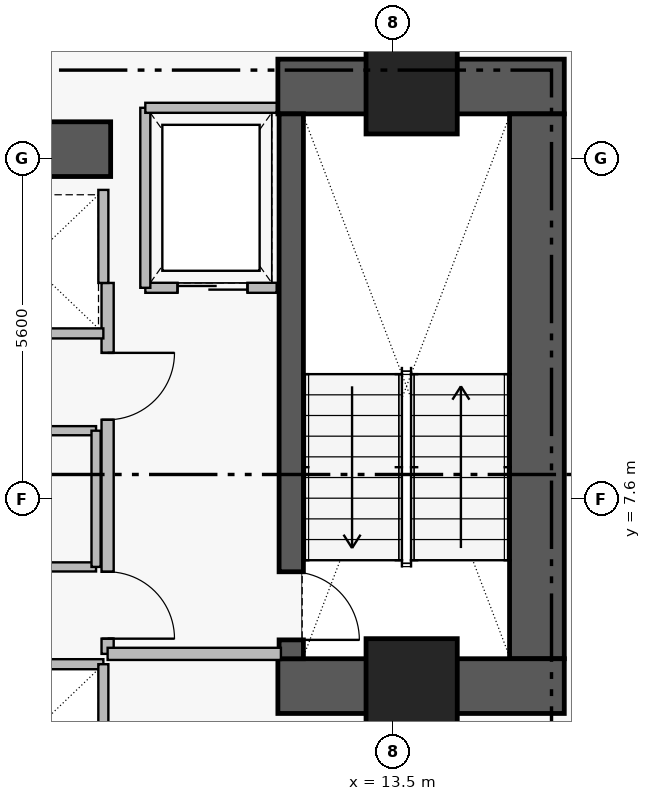
"""IFC4 building model, lengths in metres.
Left out: names, types, materials, properties, quantities, classifications, styles, units other than length and angle.
Written with IfcOpenShell. Run it as: python <this file> out.ifc"""

import sys

from ifc_helpers import new_model, si_unit, direction, frame, frame_2d, origin, origin_2d, place, context, subcontext, project, spatial, rectangle, extrude, element, fill, save


model = new_model("IFC4")
c1 = context("Model", 3, precision=1e-05, world=origin(), true_north=direction((0.0, 1.0)))
c2 = subcontext(c1, "Body", "Model", "MODEL_VIEW")
j1 = project(units=[si_unit("LENGTHUNIT", "METRE"), si_unit("PLANEANGLEUNIT", "RADIAN")], contexts=[c1])
p1 = place(None, origin())
s1 = spatial("IfcSite", under=j1, at=p1, CompositionType="ELEMENT")
p2 = place(p1, origin())
s2 = spatial("IfcBuilding", under=s1, at=p2, CompositionType="ELEMENT")
p3 = place(p2, frame((0.0, 0.0, 27.6)))
s3 = spatial("IfcBuildingStorey", under=s2, at=p3, CompositionType="ELEMENT", Elevation=27.6)
p4 = place(p3, frame((11.6, 14.38, 0.0), z_axis=(0.0, 0.0, 1.0), x_axis=(1.0, 0.0, 0.0)))
e1 = element("IfcWall", 1, at=p4, inside=s3, PredefinedType="SHEAR", context=c2, shape_type="SweptSolid", body=[
    extrude(rectangle(XDim=4.71, YDim=0.9, at=frame_2d((2.355, 0.0))), origin(), (0.0, 0.0, 1.0), 3.46),
])
p5 = place(p3, frame((15.86, 4.97, 0.0), z_axis=(0.0, 0.0, 1.0), x_axis=(0.0, 1.0, 0.0)))
e2 = element("IfcWall", 2, at=p5, inside=s3, PredefinedType="SHEAR", context=c2, shape_type="SweptSolid", body=[
    extrude(rectangle(XDim=8.96, YDim=0.9, at=frame_2d((4.48, 0.0))), origin(), (0.0, 0.0, 1.0), 3.46),
])
p6 = place(p3, frame((11.6, 4.52, 0.0), z_axis=(0.0, 0.0, 1.0), x_axis=(1.0, 0.0, 0.0)))
e3 = element("IfcWall", 3, at=p6, inside=s3, PredefinedType="SHEAR", context=c2, shape_type="SweptSolid", body=[
    extrude(rectangle(XDim=4.71, YDim=0.9, at=frame_2d((2.355, 0.0))), origin(), (0.0, 0.0, 1.0), 3.46),
])
p7 = place(p3, frame((1.25, 13.35, 0.0), z_axis=(0.0, 0.0, 1.0), x_axis=(1.0, 0.0, 0.0)))
e4 = element("IfcWall", 4, at=p7, inside=s3, PredefinedType="SHEAR", context=c2, shape_type="SweptSolid", body=[
    extrude(rectangle(XDim=7.6, YDim=0.9, at=frame_2d((3.8, 0.0))), origin(), (0.0, 0.0, 1.0), 3.43),
])
p8 = place(p3, frame((11.82, 13.93, 0.0), z_axis=(0.0, 0.0, 1.0), x_axis=(0.0, -1.0, 0.0)))
e5 = element("IfcWall", 5, at=p8, inside=s3, PredefinedType="SHEAR", context=c2, shape_type="SweptSolid", body=[
    extrude(rectangle(XDim=8.96, YDim=0.4, at=frame_2d((4.48, 0.0))), origin(), (0.0, 0.0, 1.0), 3.46),
])
p9 = place(p8, frame((7.53, 0.0, 0.0)))
e6 = element("IfcOpeningElement", 6, at=p9, cuts=e5, PredefinedType="OPENING", context=c2, shape_type="SweptSolid", body=[
    extrude(rectangle(XDim=1.12, YDim=2.22, at=frame_2d((0.56, 1.11))), frame((0.0, 0.21, 0.0), z_axis=(0.0, -1.0, 0.0), x_axis=(1.0, 0.0, 0.0)), (0.0, 0.0, 1.0), 0.42),
])
for number, where, z_axis, x_axis in (
    (7, (13.8, 14.35, 0.0), (0.0, 0.0, 1.0), (1.0, 0.0, 0.0)),
    (8, (13.8, 4.55, 0.0), (0.0, 0.0, 1.0), (1.0, 0.0, 0.0)),
):
    element("IfcColumn", number, at=place(p3, frame(where, z_axis=z_axis, x_axis=x_axis)), inside=s3, PredefinedType="COLUMN", context=c2, shape_type="SweptSolid", body=[
        extrude(rectangle(XDim=1.5, YDim=1.5, at=origin_2d()), origin(), (0.0, 0.0, 1.0), 3.65),
    ])
p10 = place(p3, frame((8.8, 11.15, 0.0), z_axis=(0.0, 0.0, 1.0), x_axis=(0.0, -1.0, 0.0)))
e9 = element("IfcWall", 9, at=p10, inside=s3, PredefinedType="PARTITIONING", context=c2, shape_type="SweptSolid", body=[
    extrude(rectangle(XDim=6.1, YDim=0.2, at=frame_2d((3.05, 0.0))), origin(), (0.0, 0.0, 1.0), 3.43),
])
p11 = place(p10, frame((1.15, 0.0, 0.0)))
e10 = element("IfcOpeningElement", 10, at=p11, cuts=e9, PredefinedType="OPENING", context=c2, shape_type="SweptSolid", body=[
    extrude(rectangle(XDim=1.1, YDim=2.2, at=frame_2d((0.55, 1.1))), frame((0.0, 0.11, 0.0), z_axis=(0.0, -1.0, 0.0), x_axis=(1.0, 0.0, 0.0)), (0.0, 0.0, 1.0), 0.22),
])
p12 = place(p10, frame((4.75, 0.0, 0.0)))
e11 = element("IfcOpeningElement", 11, at=p12, cuts=e9, PredefinedType="OPENING", context=c2, shape_type="SweptSolid", body=[
    extrude(rectangle(XDim=1.1, YDim=2.2, at=frame_2d((0.55, 1.1))), frame((0.0, 0.11, 0.0), z_axis=(0.0, -1.0, 0.0), x_axis=(1.0, 0.0, 0.0)), (0.0, 0.0, 1.0), 0.22),
])
p13 = place(p3, frame((9.42, 11.07, 0.0), z_axis=(0.0, 0.0, 1.0), x_axis=(1.0, 0.0, 0.0)))
e12 = element("IfcWall", 12, at=p13, inside=s3, PredefinedType="PARTITIONING", context=c2, shape_type="SweptSolid", body=[
    extrude(rectangle(XDim=2.16, YDim=0.165, at=frame_2d((1.08, 0.0))), origin(), (0.0, 0.0, 1.0), 3.43),
])
p14 = place(p13, frame((0.53, 0.0, 0.0)))
e13 = element("IfcOpeningElement", 13, at=p14, cuts=e12, PredefinedType="OPENING", context=c2, shape_type="SweptSolid", body=[
    extrude(rectangle(XDim=1.15, YDim=2.25, at=frame_2d((0.575, 1.125))), frame((0.0, 0.093, 0.0), z_axis=(0.0, -1.0, 0.0), x_axis=(1.0, 0.0, 0.0)), (0.0, 0.0, 1.0), 0.185),
])
p15 = place(p3, frame((4.29, 6.48, 0.0), z_axis=(0.0, 0.0, 1.0), x_axis=(1.0, 0.0, 0.0)))
e14 = element("IfcWall", 14, at=p15, inside=s3, PredefinedType="PARTITIONING", context=c2, shape_type="SweptSolid", body=[
    extrude(rectangle(XDim=4.32, YDim=0.15, at=frame_2d((2.16, 0.0))), origin(), (0.0, 0.0, 1.0), 3.43),
])
p16 = place(p15, frame((1.71, 0.0, 0.0)))
e15 = element("IfcOpeningElement", 15, at=p16, cuts=e14, PredefinedType="OPENING", context=c2, shape_type="SweptSolid", body=[
    extrude(rectangle(XDim=0.9, YDim=2.15, at=frame_2d((0.45, 1.075))), frame((0.0, 0.085, 0.0), z_axis=(0.0, -1.0, 0.0), x_axis=(1.0, 0.0, 0.0)), (0.0, 0.0, 1.0), 0.17),
])
p17 = place(p3, frame((8.8, 5.05, 0.0), z_axis=(0.0, 0.0, 1.0), x_axis=(1.0, 0.0, 0.0)))
e16 = element("IfcWall", 16, at=p17, inside=s3, PredefinedType="PARTITIONING", context=c2, shape_type="SweptSolid", body=[
    extrude(rectangle(XDim=2.85, YDim=0.2, at=frame_2d((1.425, 0.0))), origin(), (0.0, 0.0, 1.0), 3.43),
])
p18 = place(p3, frame((9.42, 11.07, 0.0), z_axis=(0.0, 0.0, 1.0), x_axis=(0.0, 1.0, 0.0)))
e17 = element("IfcWall", 17, at=p18, inside=s3, PredefinedType="PARTITIONING", context=c2, shape_type="SweptSolid", body=[
    extrude(rectangle(XDim=2.96, YDim=0.165, at=frame_2d((1.48, 0.0))), origin(), (0.0, 0.0, 1.0), 3.43),
])
p19 = place(p3, frame((9.42, 14.03, 0.0), z_axis=(0.0, 0.0, 1.0), x_axis=(1.0, 0.0, 0.0)))
e18 = element("IfcWall", 18, at=p19, inside=s3, PredefinedType="PARTITIONING", context=c2, shape_type="SweptSolid", body=[
    extrude(rectangle(XDim=2.16, YDim=0.165, at=frame_2d((1.08, 0.0))), origin(), (0.0, 0.0, 1.0), 3.43),
])
p20 = place(p3, frame((6.25, 4.88, 0.0), z_axis=(0.0, 0.0, 1.0), x_axis=(1.0, 0.0, 0.0)))
e19 = element("IfcWall", 19, at=p20, inside=s3, PredefinedType="PARTITIONING", context=c2, shape_type="SweptSolid", body=[
    extrude(rectangle(XDim=2.48, YDim=0.165, at=frame_2d((1.24, 0.0))), origin(), (0.0, 0.0, 1.0), 3.43),
])
p21 = place(p3, frame((8.73, 2.52, 0.0), z_axis=(0.0, 0.0, 1.0), x_axis=(0.0, 1.0, 0.0)))
e20 = element("IfcWall", 20, at=p21, inside=s3, PredefinedType="PARTITIONING", context=c2, shape_type="SweptSolid", body=[
    extrude(rectangle(XDim=2.36, YDim=0.165, at=frame_2d((1.18, 0.0))), origin(), (0.0, 0.0, 1.0), 3.43),
])
p22 = place(p3, frame((6.25, 10.32, 0.0), z_axis=(0.0, 0.0, 1.0), x_axis=(1.0, 0.0, 0.0)))
e21 = element("IfcWall", 21, at=p22, inside=s3, PredefinedType="PARTITIONING", context=c2, shape_type="SweptSolid", body=[
    extrude(rectangle(XDim=2.48, YDim=0.165, at=frame_2d((1.24, 0.0))), origin(), (0.0, 0.0, 1.0), 3.43),
])
p23 = place(p3, frame((8.73, 11.15, 0.0), z_axis=(0.0, 0.0, 1.0), x_axis=(0.0, 1.0, 0.0)))
e22 = element("IfcWall", 22, at=p23, inside=s3, PredefinedType="PARTITIONING", context=c2, shape_type="SweptSolid", body=[
    extrude(rectangle(XDim=1.53, YDim=0.165, at=frame_2d((0.765, 0.0))), origin(), (0.0, 0.0, 1.0), 3.43),
])
p24 = place(p3, frame((4.29, 8.72, 0.0), z_axis=(0.0, 0.0, 1.0), x_axis=(1.0, 0.0, 0.0)))
e23 = element("IfcWall", 23, at=p24, inside=s3, PredefinedType="PARTITIONING", context=c2, shape_type="SweptSolid", body=[
    extrude(rectangle(XDim=4.32, YDim=0.15, at=frame_2d((2.16, 0.0))), origin(), (0.0, 0.0, 1.0), 3.43),
])
p25 = place(p3, frame((8.61, 6.48, 0.0), z_axis=(0.0, 0.0, 1.0), x_axis=(0.0, 1.0, 0.0)))
e24 = element("IfcWall", 24, at=p25, inside=s3, PredefinedType="PARTITIONING", context=c2, shape_type="SweptSolid", body=[
    extrude(rectangle(XDim=2.24, YDim=0.15, at=frame_2d((1.12, 0.0))), origin(), (0.0, 0.0, 1.0), 3.43),
])
p26 = place(p9, origin())
e25 = element("IfcDoor", 25, at=p26, inside=s3, OperationType="SINGLE_SWING_RIGHT", PredefinedType="DOOR", context=c2, shape_type="SweptSolid", body=[
    extrude(rectangle(XDim=1.12, YDim=2.22, at=frame_2d((0.56, 1.11))), frame((0.0, 0.025, 0.0), z_axis=(0.0, -1.0, 0.0), x_axis=(1.0, 0.0, 0.0)), (0.0, 0.0, 1.0), 0.05),
])
fill(e6, e25)
p27 = place(p11, origin())
e26 = element("IfcDoor", 26, at=p27, inside=s3, OperationType="SINGLE_SWING_LEFT", PredefinedType="DOOR", context=c2, shape_type="SweptSolid", body=[
    extrude(rectangle(XDim=1.1, YDim=2.2, at=frame_2d((0.55, 1.1))), frame((0.0, 0.025, 0.0), z_axis=(0.0, -1.0, 0.0), x_axis=(1.0, 0.0, 0.0)), (0.0, 0.0, 1.0), 0.05),
])
fill(e10, e26)
p28 = place(p12, origin())
e27 = element("IfcDoor", 27, at=p28, inside=s3, OperationType="SINGLE_SWING_RIGHT", PredefinedType="DOOR", context=c2, shape_type="SweptSolid", body=[
    extrude(rectangle(XDim=1.1, YDim=2.2, at=frame_2d((0.55, 1.1))), frame((0.0, 0.025, 0.0), z_axis=(0.0, -1.0, 0.0), x_axis=(1.0, 0.0, 0.0)), (0.0, 0.0, 1.0), 0.05),
])
fill(e11, e27)
p29 = place(p14, origin())
e28 = element("IfcDoor", 28, at=p29, inside=s3, OperationType="SLIDING_TO_LEFT", PredefinedType="DOOR", context=c2, shape_type="SweptSolid", body=[
    extrude(rectangle(XDim=1.15, YDim=2.25, at=frame_2d((0.575, 1.125))), frame((0.0, 0.025, 0.0), z_axis=(0.0, -1.0, 0.0), x_axis=(1.0, 0.0, 0.0)), (0.0, 0.0, 1.0), 0.05),
])
fill(e13, e28)
save(model, sys.argv[1])
